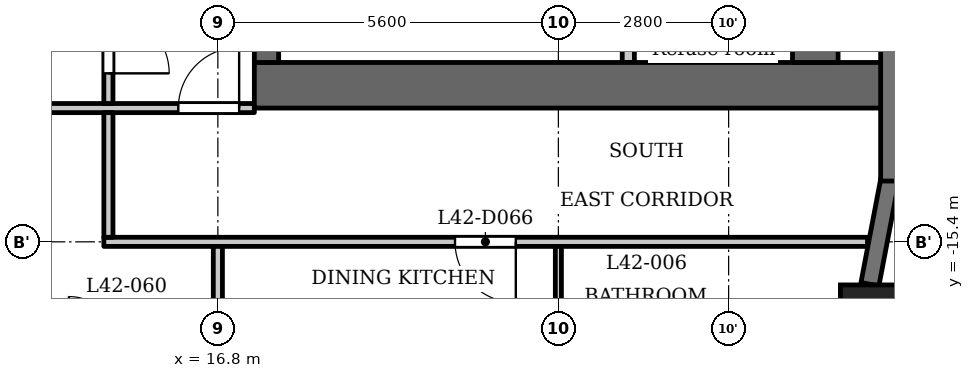
"""IFC4 building model, lengths in metres.
Left out: names, types, materials, properties, quantities, classifications, styles, units other than length and angle.
Written with IfcOpenShell. Run it as: python <this file> out.ifc"""

import sys

from ifc_helpers import new_model, si_unit, direction, frame, frame_2d, origin, origin_2d, place, context, subcontext, project, spatial, rectangle, extrude, element, fill, save


model = new_model("IFC4")
c1 = context("Model", 3, precision=1e-05, world=origin(), true_north=direction((0.0, 1.0)))
c2 = subcontext(c1, "Body", "Model", "MODEL_VIEW")
j1 = project(units=[si_unit("LENGTHUNIT", "METRE"), si_unit("PLANEANGLEUNIT", "RADIAN")], contexts=[c1])
p1 = place(None, origin())
s1 = spatial("IfcSite", under=j1, at=p1, CompositionType="ELEMENT")
p2 = place(p1, origin())
s2 = spatial("IfcBuilding", under=s1, at=p2, CompositionType="ELEMENT")
p3 = place(p2, frame((0.0, 0.0, 164.1)))
s3 = spatial("IfcBuildingStorey", under=s2, at=p3, CompositionType="ELEMENT", Elevation=164.1)
p4 = place(p3, frame((27.538, -16.609, 0.0), z_axis=(0.0, 0.0, 1.0), x_axis=(1.0, 0.0, 0.0)))
e1 = element("IfcColumn", 1, at=p4, inside=s3, PredefinedType="COLUMN", context=c2, shape_type="SweptSolid", body=[
    extrude(rectangle(XDim=1.0, YDim=1.0, at=origin_2d()), origin(), (0.0, 0.0, 1.0), 3.5),
])
p5 = place(p3, frame((27.524, -16.097, 0.0), z_axis=(0.0, 0.0, 1.0), x_axis=(0.187259034321, 0.982310569049, 0.0)))
e2 = element("IfcWall", 2, at=p5, inside=s3, PredefinedType="SOLIDWALL", context=c2, shape_type="SweptSolid", body=[
    extrude(rectangle(XDim=1.756, YDim=0.3, at=frame_2d((0.878, 0.0))), origin(), (0.0, 0.0, 1.0), 2.45),
])
p6 = place(p3, frame((27.85, -14.4, 0.0), z_axis=(0.0, 0.0, 1.0), x_axis=(0.0, 1.0, 0.0)))
e3 = element("IfcWall", 3, at=p6, inside=s3, PredefinedType="SOLIDWALL", context=c2, shape_type="SweptSolid", body=[
    extrude(rectangle(XDim=2.7, YDim=0.3, at=frame_2d((1.35, 0.0))), origin(), (0.0, 0.0, 1.0), 2.45),
])
p7 = place(p3, frame((17.4, -12.825, 0.0), z_axis=(0.0, 0.0, 1.0), x_axis=(1.0, 0.0, 0.0)))
e4 = element("IfcWall", 4, at=p7, inside=s3, PredefinedType="SHEAR", context=c2, shape_type="SweptSolid", body=[
    extrude(rectangle(XDim=10.4, YDim=0.75, at=frame_2d((5.2, 0.0))), origin(), (0.0, 0.0, 1.0), 3.2),
])
p8 = place(p3, frame((17.6, -12.45, 0.0), z_axis=(0.0, 0.0, 1.0), x_axis=(0.0, 1.0, 0.0)))
e5 = element("IfcWall", 5, at=p8, inside=s3, PredefinedType="SHEAR", context=c2, shape_type="SweptSolid", body=[
    extrude(rectangle(XDim=24.9, YDim=0.4, at=frame_2d((12.45, 0.0))), origin(), (0.0, 0.0, 1.0), 3.2),
])
p9 = place(p8, frame((8.65, 0.0, 0.0)))
e6 = element("IfcOpeningElement", 6, at=p9, cuts=e5, PredefinedType="OPENING", context=c2, shape_type="SweptSolid", body=[
    extrude(rectangle(XDim=0.9, YDim=2.1, at=frame_2d((0.45, 1.05))), frame((0.0, 0.21, 0.0), z_axis=(0.0, -1.0, 0.0), x_axis=(1.0, 0.0, 0.0)), (0.0, 0.0, 1.0), 0.42),
])
p10 = place(p8, frame((15.6, 0.0, 0.0)))
e7 = element("IfcOpeningElement", 7, at=p10, cuts=e5, PredefinedType="OPENING", context=c2, shape_type="SweptSolid", body=[
    extrude(rectangle(XDim=1.1, YDim=2.1, at=frame_2d((0.55, 1.05))), frame((0.0, 0.21, 0.0), z_axis=(0.0, -1.0, 0.0), x_axis=(1.0, 0.0, 0.0)), (0.0, 0.0, 1.0), 0.42),
])
p11 = place(p8, frame((18.0, 0.0, 0.0)))
e8 = element("IfcOpeningElement", 8, at=p11, cuts=e5, PredefinedType="OPENING", context=c2, shape_type="SweptSolid", body=[
    extrude(rectangle(XDim=1.1, YDim=2.1, at=frame_2d((0.55, 1.05))), frame((0.0, 0.21, 0.0), z_axis=(0.0, -1.0, 0.0), x_axis=(1.0, 0.0, 0.0)), (0.0, 0.0, 1.0), 0.42),
])
p12 = place(p8, frame((23.025, 0.0, 0.0)))
e9 = element("IfcOpeningElement", 9, at=p12, cuts=e5, PredefinedType="OPENING", context=c2, shape_type="SweptSolid", body=[
    extrude(rectangle(XDim=1.1, YDim=2.1, at=frame_2d((0.55, 1.05))), frame((0.0, 0.21, 0.0), z_axis=(0.0, -1.0, 0.0), x_axis=(1.0, 0.0, 0.0)), (0.0, 0.0, 1.0), 0.42),
])
p13 = place(p8, frame((0.775, 0.0, 0.0)))
e10 = element("IfcOpeningElement", 10, at=p13, cuts=e5, PredefinedType="OPENING", context=c2, shape_type="SweptSolid", body=[
    extrude(rectangle(XDim=1.1, YDim=2.1, at=frame_2d((0.55, 1.05))), frame((0.0, 0.21, 0.0), z_axis=(0.0, -1.0, 0.0), x_axis=(1.0, 0.0, 0.0)), (0.0, 0.0, 1.0), 0.42),
])
p14 = place(p8, frame((12.925, 0.0, 0.0)))
e11 = element("IfcOpeningElement", 11, at=p14, cuts=e5, PredefinedType="OPENING", context=c2, shape_type="SweptSolid", body=[
    extrude(rectangle(XDim=1.8, YDim=2.1, at=frame_2d((0.9, 1.05))), frame((0.0, 0.21, 0.0), z_axis=(0.0, -1.0, 0.0), x_axis=(1.0, 0.0, 0.0)), (0.0, 0.0, 1.0), 0.42),
])
p15 = place(p3, frame((26.625, -12.45, 0.0), z_axis=(0.0, 0.0, 1.0), x_axis=(0.0, 1.0, 0.0)))
e12 = element("IfcWall", 12, at=p15, inside=s3, PredefinedType="SHEAR", context=c2, shape_type="SweptSolid", body=[
    extrude(rectangle(XDim=24.9, YDim=0.75, at=frame_2d((12.45, 0.0))), origin(), (0.0, 0.0, 1.0), 3.2),
])
p16 = place(p3, frame((23.55, -12.45, 0.0), z_axis=(0.0, 0.0, 1.0), x_axis=(0.0, 1.0, 0.0)))
e13 = element("IfcWall", 13, at=p16, inside=s3, PredefinedType="PARTITIONING", context=c2, shape_type="SweptSolid", body=[
    extrude(rectangle(XDim=2.65, YDim=0.2, at=frame_2d((1.325, 0.0))), origin(), (0.0, 0.0, 1.0), 3.2),
])
p17 = place(p16, frame((0.875, 0.0, 0.0)))
e14 = element("IfcOpeningElement", 14, at=p17, cuts=e13, PredefinedType="OPENING", context=c2, shape_type="SweptSolid", body=[
    extrude(rectangle(XDim=0.9, YDim=2.1, at=frame_2d((0.45, 1.05))), frame((0.0, 0.11, 0.0), z_axis=(0.0, -1.0, 0.0), x_axis=(1.0, 0.0, 0.0)), (0.0, 0.0, 1.0), 0.22),
])
p18 = place(p3, frame((14.925, -15.4, 0.0), z_axis=(0.0, 0.0, 1.0), x_axis=(1.0, 0.0, 0.0)))
e15 = element("IfcWall", 15, at=p18, inside=s3, PredefinedType="PARTITIONING", context=c2, shape_type="SweptSolid", body=[
    extrude(rectangle(XDim=12.559, YDim=0.15, at=frame_2d((6.279, 0.0))), origin(), (0.0, 0.0, 1.0), 3.2),
])
p19 = place(p18, frame((5.775, 0.0, 0.0)))
e16 = element("IfcOpeningElement", 16, at=p19, cuts=e15, PredefinedType="OPENING", context=c2, shape_type="SweptSolid", body=[
    extrude(rectangle(XDim=1.0, YDim=2.1, at=frame_2d((0.5, 1.05))), frame((0.0, 0.085, 0.0), z_axis=(0.0, -1.0, 0.0), x_axis=(1.0, 0.0, 0.0)), (0.0, 0.0, 1.0), 0.17),
])
p20 = place(p3, frame((-17.4, -13.2, 0.0), z_axis=(0.0, 0.0, 1.0), x_axis=(1.0, 0.0, 0.0)))
e17 = element("IfcWall", 17, at=p20, inside=s3, PredefinedType="PARTITIONING", context=c2, shape_type="SweptSolid", body=[
    extrude(rectangle(XDim=34.8, YDim=0.15, at=frame_2d((17.4, 0.0))), origin(), (0.0, 0.0, 1.0), 3.2),
])
p21 = place(p20, frame((0.15, 0.0, 0.0)))
e18 = element("IfcOpeningElement", 18, at=p21, cuts=e17, PredefinedType="OPENING", context=c2, shape_type="SweptSolid", body=[
    extrude(rectangle(XDim=1.0, YDim=2.1, at=frame_2d((0.5, 1.05))), frame((0.0, 0.085, 0.0), z_axis=(0.0, -1.0, 0.0), x_axis=(1.0, 0.0, 0.0)), (0.0, 0.0, 1.0), 0.17),
])
p22 = place(p20, frame((33.55, 0.0, 0.0)))
e19 = element("IfcOpeningElement", 19, at=p22, cuts=e17, PredefinedType="OPENING", context=c2, shape_type="SweptSolid", body=[
    extrude(rectangle(XDim=1.0, YDim=2.1, at=frame_2d((0.5, 1.05))), frame((0.0, 0.085, 0.0), z_axis=(0.0, -1.0, 0.0), x_axis=(1.0, 0.0, 0.0)), (0.0, 0.0, 1.0), 0.17),
])
p23 = place(p20, frame((3.5, 0.0, 0.0)))
e20 = element("IfcOpeningElement", 20, at=p23, cuts=e17, PredefinedType="OPENING", context=c2, shape_type="SweptSolid", body=[
    extrude(rectangle(XDim=1.0, YDim=2.1, at=frame_2d((0.5, 1.05))), frame((0.0, 0.085, 0.0), z_axis=(0.0, -1.0, 0.0), x_axis=(1.0, 0.0, 0.0)), (0.0, 0.0, 1.0), 0.17),
])
p24 = place(p20, frame((10.1, 0.0, 0.0)))
e21 = element("IfcOpeningElement", 21, at=p24, cuts=e17, PredefinedType="OPENING", context=c2, shape_type="SweptSolid", body=[
    extrude(rectangle(XDim=1.0, YDim=2.1, at=frame_2d((0.5, 1.05))), frame((0.0, 0.085, 0.0), z_axis=(0.0, -1.0, 0.0), x_axis=(1.0, 0.0, 0.0)), (0.0, 0.0, 1.0), 0.17),
])
p25 = place(p20, frame((15.7, 0.0, 0.0)))
e22 = element("IfcOpeningElement", 22, at=p25, cuts=e17, PredefinedType="OPENING", context=c2, shape_type="SweptSolid", body=[
    extrude(rectangle(XDim=1.0, YDim=2.1, at=frame_2d((0.5, 1.05))), frame((0.0, 0.085, 0.0), z_axis=(0.0, -1.0, 0.0), x_axis=(1.0, 0.0, 0.0)), (0.0, 0.0, 1.0), 0.17),
])
p26 = place(p20, frame((18.05, 0.0, 0.0)))
e23 = element("IfcOpeningElement", 23, at=p26, cuts=e17, PredefinedType="OPENING", context=c2, shape_type="SweptSolid", body=[
    extrude(rectangle(XDim=1.0, YDim=2.1, at=frame_2d((0.5, 1.05))), frame((0.0, 0.085, 0.0), z_axis=(0.0, -1.0, 0.0), x_axis=(1.0, 0.0, 0.0)), (0.0, 0.0, 1.0), 0.17),
])
p27 = place(p20, frame((26.9, 0.0, 0.0)))
e24 = element("IfcOpeningElement", 24, at=p27, cuts=e17, PredefinedType="OPENING", context=c2, shape_type="SweptSolid", body=[
    extrude(rectangle(XDim=1.0, YDim=2.1, at=frame_2d((0.5, 1.05))), frame((0.0, 0.085, 0.0), z_axis=(0.0, -1.0, 0.0), x_axis=(1.0, 0.0, 0.0)), (0.0, 0.0, 1.0), 0.17),
])
p28 = place(p3, frame((15.0, -15.325, 0.0), z_axis=(0.0, 0.0, 1.0), x_axis=(0.0, 1.0, 0.0)))
e25 = element("IfcWall", 25, at=p28, inside=s3, PredefinedType="PARTITIONING", context=c2, shape_type="SweptSolid", body=[
    extrude(rectangle(XDim=2.05, YDim=0.15, at=frame_2d((1.025, 0.0))), origin(), (0.0, 0.0, 1.0), 3.2),
])
p29 = place(p3, frame((15.0, -13.125, 0.0), z_axis=(0.0, 0.0, 1.0), x_axis=(0.0, 1.0, 0.0)))
e26 = element("IfcWall", 26, at=p29, inside=s3, PredefinedType="PARTITIONING", context=c2, shape_type="SweptSolid", body=[
    extrude(rectangle(XDim=6.356, YDim=0.15, at=frame_2d((3.178, 0.0))), origin(), (0.0, 0.0, 1.0), 3.2),
])
p30 = place(p29, frame((0.496, 0.0, 0.0)))
e27 = element("IfcOpeningElement", 27, at=p30, cuts=e26, PredefinedType="OPENING", context=c2, shape_type="SweptSolid", body=[
    extrude(rectangle(XDim=1.0, YDim=2.1, at=frame_2d((0.5, 1.05))), frame((0.0, 0.085, 0.0), z_axis=(0.0, -1.0, 0.0), x_axis=(1.0, 0.0, 0.0)), (0.0, 0.0, 1.0), 0.17),
])
p31 = place(p3, frame((16.8, -22.88, 0.0), z_axis=(0.0, 0.0, 1.0), x_axis=(0.0, 1.0, 0.0)))
e28 = element("IfcWall", 28, at=p31, inside=s3, PredefinedType="PARTITIONING", context=c2, shape_type="SweptSolid", body=[
    extrude(rectangle(XDim=7.405, YDim=0.15, at=frame_2d((3.702, 0.0))), origin(), (0.0, 0.0, 1.0), 3.2),
])
p32 = place(p3, frame((22.4, -17.75, 0.0), z_axis=(0.0, 0.0, 1.0), x_axis=(0.0, 1.0, 0.0)))
e29 = element("IfcWall", 29, at=p32, inside=s3, PredefinedType="PARTITIONING", context=c2, shape_type="SweptSolid", body=[
    extrude(rectangle(XDim=2.275, YDim=0.1, at=frame_2d((1.137, 0.0))), origin(), (0.0, 0.0, 1.0), 3.2),
])
p33 = place(p30, origin())
e30 = element("IfcDoor", 30, at=p33, inside=s3, OperationType="SINGLE_SWING_LEFT", PredefinedType="DOOR", context=c2, shape_type="SweptSolid", body=[
    extrude(rectangle(XDim=1.0, YDim=2.1, at=frame_2d((0.5, 1.05))), frame((0.0, 0.025, 0.0), z_axis=(0.0, -1.0, 0.0), x_axis=(1.0, 0.0, 0.0)), (0.0, 0.0, 1.0), 0.05),
])
fill(e27, e30)
p34 = place(p22, origin())
e31 = element("IfcDoor", 31, at=p34, inside=s3, OperationType="SINGLE_SWING_LEFT", PredefinedType="DOOR", context=c2, shape_type="SweptSolid", body=[
    extrude(rectangle(XDim=1.0, YDim=2.1, at=frame_2d((0.5, 1.05))), frame((0.0, 0.025, 0.0), z_axis=(0.0, -1.0, 0.0), x_axis=(1.0, 0.0, 0.0)), (0.0, 0.0, 1.0), 0.05),
])
fill(e19, e31)
p35 = place(p19, origin())
e32 = element("IfcDoor", 32, at=p35, inside=s3, OperationType="SINGLE_SWING_RIGHT", PredefinedType="DOOR", context=c2, shape_type="SweptSolid", body=[
    extrude(rectangle(XDim=1.0, YDim=2.1, at=frame_2d((0.5, 1.05))), frame((0.0, 0.025, 0.0), z_axis=(0.0, -1.0, 0.0), x_axis=(1.0, 0.0, 0.0)), (0.0, 0.0, 1.0), 0.05),
])
fill(e16, e32)
save(model, sys.argv[1])
